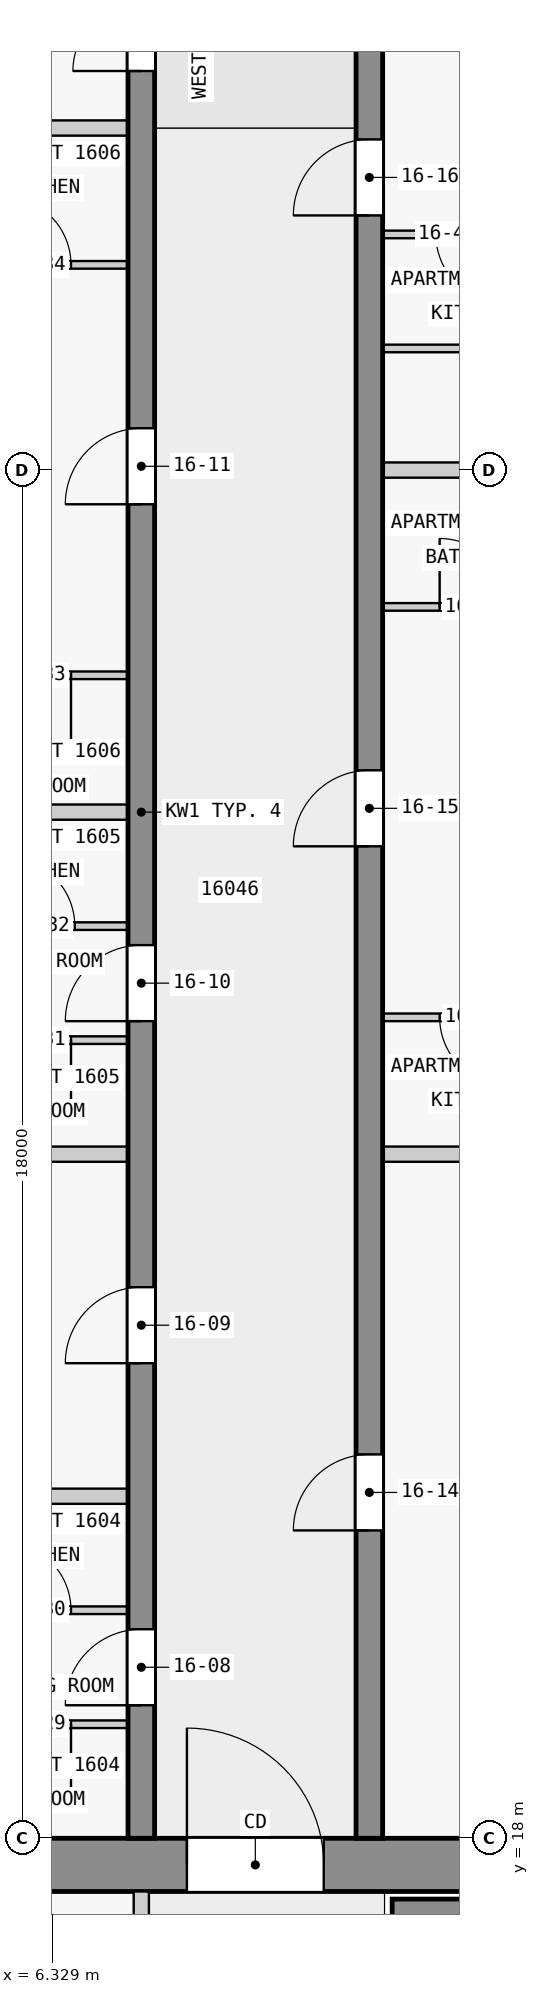
"""IFC4 building model, lengths in metres.
Left out: names, types, materials, properties, quantities, classifications, styles, units other than length and angle.
Written with IfcOpenShell. Run it as: python <this file> out.ifc"""

import sys

from ifc_helpers import new_model, si_unit, direction, frame, frame_2d, origin, place, context, subcontext, project, spatial, rectangle, extrude, element, fill, save


model = new_model("IFC4")
c1 = context("Model", 3, precision=1e-05, world=origin(), true_north=direction((0.0, 1.0)))
c2 = subcontext(c1, "Body", "Model", "MODEL_VIEW")
j1 = project(units=[si_unit("LENGTHUNIT", "METRE"), si_unit("PLANEANGLEUNIT", "RADIAN")], contexts=[c1])
p1 = place(None, origin())
s1 = spatial("IfcSite", under=j1, at=p1, CompositionType="ELEMENT")
p2 = place(p1, origin())
s2 = spatial("IfcBuilding", under=s1, at=p2, CompositionType="ELEMENT")
p3 = place(p2, frame((0.0, 0.0, 65.3)))
s3 = spatial("IfcBuildingStorey", under=s2, at=p3, CompositionType="ELEMENT", Elevation=65.3)
p4 = place(p3, frame((1.6, 17.65, 0.0), z_axis=(0.0, 0.0, 1.0), x_axis=(1.0, 0.0, 0.0)))
e1 = element("IfcWall", 1, at=p4, inside=s3, PredefinedType="SHEAR", context=c2, shape_type="SweptSolid", body=[
    extrude(rectangle(XDim=20.9, YDim=0.7, at=frame_2d((10.45, 0.0))), origin(), (0.0, 0.0, 1.0), 3.25),
])
p5 = place(p4, frame((6.5, 0.0, 0.0)))
e2 = element("IfcOpeningElement", 2, at=p5, cuts=e1, PredefinedType="OPENING", context=c2, shape_type="SweptSolid", body=[
    extrude(rectangle(XDim=1.8, YDim=2.1, at=frame_2d((0.9, 1.05))), frame((0.0, 0.36, 0.0), z_axis=(0.0, -1.0, 0.0), x_axis=(1.0, 0.0, 0.0)), (0.0, 0.0, 1.0), 0.72),
])
p6 = place(p3, frame((10.8, 17.05, 0.0), z_axis=(0.0, 0.0, 1.0), x_axis=(1.0, 0.0, 0.0)))
e3 = element("IfcWall", 3, at=p6, inside=s3, PredefinedType="SHEAR", context=c2, shape_type="SweptSolid", body=[
    extrude(rectangle(XDim=7.8, YDim=0.3, at=frame_2d((3.9, 0.0))), origin(), (0.0, 0.0, 1.0), 3.25),
])
p7 = place(p3, frame((7.5, 18.0, 0.0), z_axis=(0.0, 0.0, 1.0), x_axis=(0.0, 1.0, 0.0)))
e4 = element("IfcWall", 4, at=p7, inside=s3, PredefinedType="SHEAR", context=c2, shape_type="SweptSolid", body=[
    extrude(rectangle(XDim=27.0, YDim=0.35, at=frame_2d((13.5, 0.0))), origin(), (0.0, 0.0, 1.0), 3.25),
])
p8 = place(p7, frame((1.75, 0.0, 0.0)))
e5 = element("IfcOpeningElement", 5, at=p8, cuts=e4, PredefinedType="OPENING", context=c2, shape_type="SweptSolid", body=[
    extrude(rectangle(XDim=1.0, YDim=2.1, at=frame_2d((0.5, 1.05))), frame((0.0, 0.185, 0.0), z_axis=(0.0, -1.0, 0.0), x_axis=(1.0, 0.0, 0.0)), (0.0, 0.0, 1.0), 0.37),
])
p9 = place(p7, frame((6.25, 0.0, 0.0)))
e6 = element("IfcOpeningElement", 6, at=p9, cuts=e4, PredefinedType="OPENING", context=c2, shape_type="SweptSolid", body=[
    extrude(rectangle(XDim=1.0, YDim=2.1, at=frame_2d((0.5, 1.05))), frame((0.0, 0.185, 0.0), z_axis=(0.0, -1.0, 0.0), x_axis=(1.0, 0.0, 0.0)), (0.0, 0.0, 1.0), 0.37),
])
p10 = place(p7, frame((10.75, 0.0, 0.0)))
e7 = element("IfcOpeningElement", 7, at=p10, cuts=e4, PredefinedType="OPENING", context=c2, shape_type="SweptSolid", body=[
    extrude(rectangle(XDim=1.0, YDim=2.1, at=frame_2d((0.5, 1.05))), frame((0.0, 0.185, 0.0), z_axis=(0.0, -1.0, 0.0), x_axis=(1.0, 0.0, 0.0)), (0.0, 0.0, 1.0), 0.37),
])
p11 = place(p7, frame((17.55, 0.0, 0.0)))
e8 = element("IfcOpeningElement", 8, at=p11, cuts=e4, PredefinedType="OPENING", context=c2, shape_type="SweptSolid", body=[
    extrude(rectangle(XDim=1.0, YDim=2.1, at=frame_2d((0.5, 1.05))), frame((0.0, 0.185, 0.0), z_axis=(0.0, -1.0, 0.0), x_axis=(1.0, 0.0, 0.0)), (0.0, 0.0, 1.0), 0.37),
])
p12 = place(p7, frame((23.25, 0.0, 0.0)))
e9 = element("IfcOpeningElement", 9, at=p12, cuts=e4, PredefinedType="OPENING", context=c2, shape_type="SweptSolid", body=[
    extrude(rectangle(XDim=0.9, YDim=2.1, at=frame_2d((0.45, 1.05))), frame((0.0, 0.185, 0.0), z_axis=(0.0, -1.0, 0.0), x_axis=(1.0, 0.0, 0.0)), (0.0, 0.0, 1.0), 0.37),
])
p13 = place(p7, frame((25.45, 0.0, 0.0)))
e10 = element("IfcOpeningElement", 10, at=p13, cuts=e4, PredefinedType="OPENING", context=c2, shape_type="SweptSolid", body=[
    extrude(rectangle(XDim=1.0, YDim=2.1, at=frame_2d((0.5, 1.05))), frame((0.0, 0.185, 0.0), z_axis=(0.0, -1.0, 0.0), x_axis=(1.0, 0.0, 0.0)), (0.0, 0.0, 1.0), 0.37),
])
p14 = place(p3, frame((10.5, 18.0, 0.0), z_axis=(0.0, 0.0, 1.0), x_axis=(0.0, 1.0, 0.0)))
e11 = element("IfcWall", 11, at=p14, inside=s3, PredefinedType="SHEAR", context=c2, shape_type="SweptSolid", body=[
    extrude(rectangle(XDim=27.0, YDim=0.35, at=frame_2d((13.5, 0.0))), origin(), (0.0, 0.0, 1.0), 3.25),
])
p15 = place(p14, frame((4.05, 0.0, 0.0)))
e12 = element("IfcOpeningElement", 12, at=p15, cuts=e11, PredefinedType="OPENING", context=c2, shape_type="SweptSolid", body=[
    extrude(rectangle(XDim=1.0, YDim=2.1, at=frame_2d((0.5, 1.05))), frame((0.0, 0.185, 0.0), z_axis=(0.0, -1.0, 0.0), x_axis=(1.0, 0.0, 0.0)), (0.0, 0.0, 1.0), 0.37),
])
p16 = place(p14, frame((13.05, 0.0, 0.0)))
e13 = element("IfcOpeningElement", 13, at=p16, cuts=e11, PredefinedType="OPENING", context=c2, shape_type="SweptSolid", body=[
    extrude(rectangle(XDim=1.0, YDim=2.1, at=frame_2d((0.5, 1.05))), frame((0.0, 0.185, 0.0), z_axis=(0.0, -1.0, 0.0), x_axis=(1.0, 0.0, 0.0)), (0.0, 0.0, 1.0), 0.37),
])
p17 = place(p14, frame((21.35, 0.0, 0.0)))
e14 = element("IfcOpeningElement", 14, at=p17, cuts=e11, PredefinedType="OPENING", context=c2, shape_type="SweptSolid", body=[
    extrude(rectangle(XDim=1.0, YDim=2.1, at=frame_2d((0.5, 1.05))), frame((0.0, 0.185, 0.0), z_axis=(0.0, -1.0, 0.0), x_axis=(1.0, 0.0, 0.0)), (0.0, 0.0, 1.0), 0.37),
])
p18 = place(p3, frame((7.5, 10.1, 0.0), z_axis=(0.0, 0.0, 1.0), x_axis=(0.0, 1.0, 0.0)))
e15 = element("IfcWall", 15, at=p18, inside=s3, PredefinedType="PARTITIONING", context=c2, shape_type="SweptSolid", body=[
    extrude(rectangle(XDim=7.2, YDim=0.2, at=frame_2d((3.6, 0.0))), origin(), (0.0, 0.0, 1.0), 3.25),
])
p19 = place(p18, frame((0.8, 0.0, 0.0)))
e16 = element("IfcOpeningElement", 16, at=p19, cuts=e15, PredefinedType="OPENING", context=c2, shape_type="SweptSolid", body=[
    extrude(rectangle(XDim=0.9, YDim=2.1, at=frame_2d((0.45, 1.05))), frame((0.0, 0.11, 0.0), z_axis=(0.0, -1.0, 0.0), x_axis=(1.0, 0.0, 0.0)), (0.0, 0.0, 1.0), 0.22),
])
p20 = place(p18, frame((3.3, 0.0, 0.0)))
e17 = element("IfcOpeningElement", 17, at=p20, cuts=e15, PredefinedType="OPENING", context=c2, shape_type="SweptSolid", body=[
    extrude(rectangle(XDim=0.9, YDim=2.1, at=frame_2d((0.45, 1.05))), frame((0.0, 0.11, 0.0), z_axis=(0.0, -1.0, 0.0), x_axis=(1.0, 0.0, 0.0)), (0.0, 0.0, 1.0), 0.22),
])
p21 = place(p18, frame((5.25, 0.0, 0.0)))
e18 = element("IfcOpeningElement", 18, at=p21, cuts=e15, PredefinedType="OPENING", context=c2, shape_type="SweptSolid", body=[
    extrude(rectangle(XDim=0.9, YDim=2.1, at=frame_2d((0.45, 1.05))), frame((0.0, 0.11, 0.0), z_axis=(0.0, -1.0, 0.0), x_axis=(1.0, 0.0, 0.0)), (0.0, 0.0, 1.0), 0.22),
])
p22 = place(p3, frame((7.325, 19.5, 0.0), z_axis=(0.0, 0.0, 1.0), x_axis=(-1.0, 0.0, 0.0)))
e19 = element("IfcWall", 19, at=p22, inside=s3, PredefinedType="PARTITIONING", context=c2, shape_type="SweptSolid", body=[
    extrude(rectangle(XDim=2.4, YDim=0.1, at=frame_2d((1.2, 0.0))), origin(), (0.0, 0.0, 1.0), 3.25),
])
p23 = place(p22, frame((0.75, 0.0, 0.0)))
e20 = element("IfcOpeningElement", 20, at=p23, cuts=e19, PredefinedType="OPENING", context=c2, shape_type="SweptSolid", body=[
    extrude(rectangle(XDim=0.9, YDim=2.1, at=frame_2d((0.45, 1.05))), frame((0.0, 0.06, 0.0), z_axis=(0.0, -1.0, 0.0), x_axis=(1.0, 0.0, 0.0)), (0.0, 0.0, 1.0), 0.12),
])
p24 = place(p3, frame((4.925, 21.0, 0.0), z_axis=(0.0, 0.0, 1.0), x_axis=(1.0, 0.0, 0.0)))
e21 = element("IfcWall", 21, at=p24, inside=s3, PredefinedType="PARTITIONING", context=c2, shape_type="SweptSolid", body=[
    extrude(rectangle(XDim=2.4, YDim=0.1, at=frame_2d((1.2, 0.0))), origin(), (0.0, 0.0, 1.0), 3.25),
])
p25 = place(p24, frame((0.75, 0.0, 0.0)))
e22 = element("IfcOpeningElement", 22, at=p25, cuts=e21, PredefinedType="OPENING", context=c2, shape_type="SweptSolid", body=[
    extrude(rectangle(XDim=0.9, YDim=2.1, at=frame_2d((0.45, 1.05))), frame((0.0, 0.06, 0.0), z_axis=(0.0, -1.0, 0.0), x_axis=(1.0, 0.0, 0.0)), (0.0, 0.0, 1.0), 0.12),
])
p26 = place(p3, frame((7.325, 22.5, 0.0), z_axis=(0.0, 0.0, 1.0), x_axis=(-1.0, 0.0, 0.0)))
e23 = element("IfcWall", 23, at=p26, inside=s3, PredefinedType="PARTITIONING", context=c2, shape_type="SweptSolid", body=[
    extrude(rectangle(XDim=2.3, YDim=0.2, at=frame_2d((1.15, 0.0))), origin(), (0.0, 0.0, 1.0), 3.25),
])
for number, where, z_axis, x_axis in (
    (24, (7.325, 27.0, 0.0), (0.0, 0.0, 1.0), (-1.0, 0.0, 0.0)),
    (25, (18.08, 27.0, 0.0), (0.0, 0.0, 1.0), (-1.0, 0.0, 0.0)),
):
    element("IfcWall", number, at=place(p3, frame(where, z_axis=z_axis, x_axis=x_axis)), inside=s3, PredefinedType="PARTITIONING", context=c2, shape_type="SweptSolid", body=[
        extrude(rectangle(XDim=7.405, YDim=0.2, at=frame_2d((3.703, 0.0))), origin(), (0.0, 0.0, 1.0), 3.25),
    ])
p27 = place(p3, frame((7.325, 28.5, 0.0), z_axis=(0.0, 0.0, 1.0), x_axis=(-1.0, 0.0, 0.0)))
e26 = element("IfcWall", 26, at=p27, inside=s3, PredefinedType="PARTITIONING", context=c2, shape_type="SweptSolid", body=[
    extrude(rectangle(XDim=2.4, YDim=0.1, at=frame_2d((1.2, 0.0))), origin(), (0.0, 0.0, 1.0), 3.25),
])
p28 = place(p27, frame((0.75, 0.0, 0.0)))
e27 = element("IfcOpeningElement", 27, at=p28, cuts=e26, PredefinedType="OPENING", context=c2, shape_type="SweptSolid", body=[
    extrude(rectangle(XDim=0.9, YDim=2.1, at=frame_2d((0.45, 1.05))), frame((0.0, 0.06, 0.0), z_axis=(0.0, -1.0, 0.0), x_axis=(1.0, 0.0, 0.0)), (0.0, 0.0, 1.0), 0.12),
])
p29 = place(p3, frame((13.075, 28.8, 0.0), z_axis=(0.0, 0.0, 1.0), x_axis=(-1.0, 0.0, 0.0)))
e28 = element("IfcWall", 28, at=p29, inside=s3, PredefinedType="PARTITIONING", context=c2, shape_type="SweptSolid", body=[
    extrude(rectangle(XDim=2.4, YDim=0.1, at=frame_2d((1.2, 0.0))), origin(), (0.0, 0.0, 1.0), 3.25),
])
p30 = place(p29, frame((0.75, 0.0, 0.0)))
e29 = element("IfcOpeningElement", 29, at=p30, cuts=e28, PredefinedType="OPENING", context=c2, shape_type="SweptSolid", body=[
    extrude(rectangle(XDim=0.9, YDim=2.1, at=frame_2d((0.45, 1.05))), frame((0.0, 0.06, 0.0), z_axis=(0.0, -1.0, 0.0), x_axis=(1.0, 0.0, 0.0)), (0.0, 0.0, 1.0), 0.12),
])
p31 = place(p3, frame((4.975, 30.0, 0.0), z_axis=(0.0, 0.0, 1.0), x_axis=(1.0, 0.0, 0.0)))
e30 = element("IfcWall", 30, at=p31, inside=s3, PredefinedType="PARTITIONING", context=c2, shape_type="SweptSolid", body=[
    extrude(rectangle(XDim=2.35, YDim=0.1, at=frame_2d((1.175, 0.0))), origin(), (0.0, 0.0, 1.0), 3.25),
])
p32 = place(p31, frame((0.75, 0.0, 0.0)))
e31 = element("IfcOpeningElement", 31, at=p32, cuts=e30, PredefinedType="OPENING", context=c2, shape_type="SweptSolid", body=[
    extrude(rectangle(XDim=0.9, YDim=2.1, at=frame_2d((0.45, 1.05))), frame((0.0, 0.06, 0.0), z_axis=(0.0, -1.0, 0.0), x_axis=(1.0, 0.0, 0.0)), (0.0, 0.0, 1.0), 0.12),
])
p33 = place(p3, frame((7.325, 31.5, 0.0), z_axis=(0.0, 0.0, 1.0), x_axis=(-1.0, 0.0, 0.0)))
e32 = element("IfcWall", 32, at=p33, inside=s3, PredefinedType="PARTITIONING", context=c2, shape_type="SweptSolid", body=[
    extrude(rectangle(XDim=2.3, YDim=0.2, at=frame_2d((1.15, 0.0))), origin(), (0.0, 0.0, 1.0), 3.25),
])
p34 = place(p3, frame((7.325, 33.3, 0.0), z_axis=(0.0, 0.0, 1.0), x_axis=(-1.0, 0.0, 0.0)))
e33 = element("IfcWall", 33, at=p34, inside=s3, PredefinedType="PARTITIONING", context=c2, shape_type="SweptSolid", body=[
    extrude(rectangle(XDim=2.35, YDim=0.1, at=frame_2d((1.175, 0.0))), origin(), (0.0, 0.0, 1.0), 3.25),
])
p35 = place(p34, frame((0.75, 0.0, 0.0)))
e34 = element("IfcOpeningElement", 34, at=p35, cuts=e33, PredefinedType="OPENING", context=c2, shape_type="SweptSolid", body=[
    extrude(rectangle(XDim=0.9, YDim=2.1, at=frame_2d((0.45, 1.05))), frame((0.0, 0.06, 0.0), z_axis=(0.0, -1.0, 0.0), x_axis=(1.0, 0.0, 0.0)), (0.0, 0.0, 1.0), 0.12),
])
p36 = place(p3, frame((10.675, 34.2, 0.0), z_axis=(0.0, 0.0, 1.0), x_axis=(1.0, 0.0, 0.0)))
e35 = element("IfcWall", 35, at=p36, inside=s3, PredefinedType="PARTITIONING", context=c2, shape_type="SweptSolid", body=[
    extrude(rectangle(XDim=2.35, YDim=0.1, at=frame_2d((1.175, 0.0))), origin(), (0.0, 0.0, 1.0), 3.25),
])
p37 = place(p36, frame((0.75, 0.0, 0.0)))
e36 = element("IfcOpeningElement", 36, at=p37, cuts=e35, PredefinedType="OPENING", context=c2, shape_type="SweptSolid", body=[
    extrude(rectangle(XDim=0.9, YDim=2.1, at=frame_2d((0.45, 1.05))), frame((0.0, 0.06, 0.0), z_axis=(0.0, -1.0, 0.0), x_axis=(1.0, 0.0, 0.0)), (0.0, 0.0, 1.0), 0.12),
])
p38 = place(p3, frame((16.6, 36.0, 0.0), z_axis=(0.0, 0.0, 1.0), x_axis=(-1.0, 0.0, 0.0)))
e37 = element("IfcWall", 37, at=p38, inside=s3, PredefinedType="PARTITIONING", context=c2, shape_type="SweptSolid", body=[
    extrude(rectangle(XDim=5.925, YDim=0.2, at=frame_2d((2.962, 0.0))), origin(), (0.0, 0.0, 1.0), 3.25),
])
p39 = place(p3, frame((13.025, 37.6, 0.0), z_axis=(0.0, 0.0, 1.0), x_axis=(-1.0, 0.0, 0.0)))
e38 = element("IfcWall", 38, at=p39, inside=s3, PredefinedType="PARTITIONING", context=c2, shape_type="SweptSolid", body=[
    extrude(rectangle(XDim=2.35, YDim=0.1, at=frame_2d((1.175, 0.0))), origin(), (0.0, 0.0, 1.0), 3.25),
])
p40 = place(p3, frame((4.925, 38.7, 0.0), z_axis=(0.0, 0.0, 1.0), x_axis=(1.0, 0.0, 0.0)))
e39 = element("IfcWall", 39, at=p40, inside=s3, PredefinedType="PARTITIONING", context=c2, shape_type="SweptSolid", body=[
    extrude(rectangle(XDim=2.4, YDim=0.1, at=frame_2d((1.2, 0.0))), origin(), (0.0, 0.0, 1.0), 3.25),
])
p41 = place(p40, frame((0.75, 0.0, 0.0)))
e40 = element("IfcOpeningElement", 40, at=p41, cuts=e39, PredefinedType="OPENING", context=c2, shape_type="SweptSolid", body=[
    extrude(rectangle(XDim=0.9, YDim=2.1, at=frame_2d((0.45, 1.05))), frame((0.0, 0.06, 0.0), z_axis=(0.0, -1.0, 0.0), x_axis=(1.0, 0.0, 0.0)), (0.0, 0.0, 1.0), 0.12),
])
p42 = place(p3, frame((13.025, 39.1, 0.0), z_axis=(0.0, 0.0, 1.0), x_axis=(-1.0, 0.0, 0.0)))
e41 = element("IfcWall", 41, at=p42, inside=s3, PredefinedType="PARTITIONING", context=c2, shape_type="SweptSolid", body=[
    extrude(rectangle(XDim=2.35, YDim=0.1, at=frame_2d((1.175, 0.0))), origin(), (0.0, 0.0, 1.0), 3.25),
])
p43 = place(p42, frame((0.75, 0.0, 0.0)))
e42 = element("IfcOpeningElement", 42, at=p43, cuts=e41, PredefinedType="OPENING", context=c2, shape_type="SweptSolid", body=[
    extrude(rectangle(XDim=0.9, YDim=2.1, at=frame_2d((0.45, 1.05))), frame((0.0, 0.06, 0.0), z_axis=(0.0, -1.0, 0.0), x_axis=(1.0, 0.0, 0.0)), (0.0, 0.0, 1.0), 0.12),
])
p44 = place(p3, frame((7.325, 40.5, 0.0), z_axis=(0.0, 0.0, 1.0), x_axis=(-1.0, 0.0, 0.0)))
e43 = element("IfcWall", 43, at=p44, inside=s3, PredefinedType="PARTITIONING", context=c2, shape_type="SweptSolid", body=[
    extrude(rectangle(XDim=2.3, YDim=0.2, at=frame_2d((1.15, 0.0))), origin(), (0.0, 0.0, 1.0), 3.25),
])
p45 = place(p5, origin())
e44 = element("IfcDoor", 44, at=p45, inside=s3, OperationType="DOUBLE_DOOR_SINGLE_SWING", PredefinedType="DOOR", context=c2, shape_type="SweptSolid", body=[
    extrude(rectangle(XDim=1.8, YDim=2.1, at=frame_2d((0.9, 1.05))), frame((0.0, 0.025, 0.0), z_axis=(0.0, -1.0, 0.0), x_axis=(1.0, 0.0, 0.0)), (0.0, 0.0, 1.0), 0.05),
])
fill(e2, e44)
p46 = place(p8, origin())
e45 = element("IfcDoor", 45, at=p46, inside=s3, OperationType="SINGLE_SWING_LEFT", PredefinedType="DOOR", context=c2, shape_type="SweptSolid", body=[
    extrude(rectangle(XDim=1.0, YDim=2.1, at=frame_2d((0.5, 1.05))), frame((0.0, 0.025, 0.0), z_axis=(0.0, -1.0, 0.0), x_axis=(1.0, 0.0, 0.0)), (0.0, 0.0, 1.0), 0.05),
])
fill(e5, e45)
p47 = place(p9, origin())
e46 = element("IfcDoor", 46, at=p47, inside=s3, OperationType="SINGLE_SWING_LEFT", PredefinedType="DOOR", context=c2, shape_type="SweptSolid", body=[
    extrude(rectangle(XDim=1.0, YDim=2.1, at=frame_2d((0.5, 1.05))), frame((0.0, 0.025, 0.0), z_axis=(0.0, -1.0, 0.0), x_axis=(1.0, 0.0, 0.0)), (0.0, 0.0, 1.0), 0.05),
])
fill(e6, e46)
p48 = place(p10, origin())
e47 = element("IfcDoor", 47, at=p48, inside=s3, OperationType="SINGLE_SWING_LEFT", PredefinedType="DOOR", context=c2, shape_type="SweptSolid", body=[
    extrude(rectangle(XDim=1.0, YDim=2.1, at=frame_2d((0.5, 1.05))), frame((0.0, 0.025, 0.0), z_axis=(0.0, -1.0, 0.0), x_axis=(1.0, 0.0, 0.0)), (0.0, 0.0, 1.0), 0.05),
])
fill(e7, e47)
p49 = place(p11, origin())
e48 = element("IfcDoor", 48, at=p49, inside=s3, OperationType="SINGLE_SWING_RIGHT", PredefinedType="DOOR", context=c2, shape_type="SweptSolid", body=[
    extrude(rectangle(XDim=1.0, YDim=2.1, at=frame_2d((0.5, 1.05))), frame((0.0, 0.025, 0.0), z_axis=(0.0, -1.0, 0.0), x_axis=(1.0, 0.0, 0.0)), (0.0, 0.0, 1.0), 0.05),
])
fill(e8, e48)
p50 = place(p12, origin())
e49 = element("IfcDoor", 49, at=p50, inside=s3, OperationType="SINGLE_SWING_RIGHT", PredefinedType="DOOR", context=c2, shape_type="SweptSolid", body=[
    extrude(rectangle(XDim=0.9, YDim=2.1, at=frame_2d((0.45, 1.05))), frame((0.0, 0.025, 0.0), z_axis=(0.0, -1.0, 0.0), x_axis=(1.0, 0.0, 0.0)), (0.0, 0.0, 1.0), 0.05),
])
fill(e9, e49)
p51 = place(p15, origin())
e50 = element("IfcDoor", 50, at=p51, inside=s3, OperationType="SINGLE_SWING_LEFT", PredefinedType="DOOR", context=c2, shape_type="SweptSolid", body=[
    extrude(rectangle(XDim=1.0, YDim=2.1, at=frame_2d((0.5, 1.05))), frame((0.0, 0.025, 0.0), z_axis=(0.0, -1.0, 0.0), x_axis=(1.0, 0.0, 0.0)), (0.0, 0.0, 1.0), 0.05),
])
fill(e12, e50)
p52 = place(p16, origin())
e51 = element("IfcDoor", 51, at=p52, inside=s3, OperationType="SINGLE_SWING_RIGHT", PredefinedType="DOOR", context=c2, shape_type="SweptSolid", body=[
    extrude(rectangle(XDim=1.0, YDim=2.1, at=frame_2d((0.5, 1.05))), frame((0.0, 0.025, 0.0), z_axis=(0.0, -1.0, 0.0), x_axis=(1.0, 0.0, 0.0)), (0.0, 0.0, 1.0), 0.05),
])
fill(e13, e51)
p53 = place(p17, origin())
e52 = element("IfcDoor", 52, at=p53, inside=s3, OperationType="SINGLE_SWING_RIGHT", PredefinedType="DOOR", context=c2, shape_type="SweptSolid", body=[
    extrude(rectangle(XDim=1.0, YDim=2.1, at=frame_2d((0.5, 1.05))), frame((0.0, 0.025, 0.0), z_axis=(0.0, -1.0, 0.0), x_axis=(1.0, 0.0, 0.0)), (0.0, 0.0, 1.0), 0.05),
])
fill(e14, e52)
p54 = place(p23, origin())
e53 = element("IfcDoor", 53, at=p54, inside=s3, OperationType="SINGLE_SWING_LEFT", PredefinedType="DOOR", context=c2, shape_type="SweptSolid", body=[
    extrude(rectangle(XDim=0.9, YDim=2.1, at=frame_2d((0.45, 1.05))), frame((0.0, 0.025, 0.0), z_axis=(0.0, -1.0, 0.0), x_axis=(1.0, 0.0, 0.0)), (0.0, 0.0, 1.0), 0.05),
])
fill(e20, e53)
p55 = place(p25, origin())
e54 = element("IfcDoor", 54, at=p55, inside=s3, OperationType="SINGLE_SWING_LEFT", PredefinedType="DOOR", context=c2, shape_type="SweptSolid", body=[
    extrude(rectangle(XDim=0.9, YDim=2.1, at=frame_2d((0.45, 1.05))), frame((0.0, 0.025, 0.0), z_axis=(0.0, -1.0, 0.0), x_axis=(1.0, 0.0, 0.0)), (0.0, 0.0, 1.0), 0.05),
])
fill(e22, e54)
p56 = place(p28, origin())
e55 = element("IfcDoor", 55, at=p56, inside=s3, OperationType="SINGLE_SWING_LEFT", PredefinedType="DOOR", context=c2, shape_type="SweptSolid", body=[
    extrude(rectangle(XDim=0.9, YDim=2.1, at=frame_2d((0.45, 1.05))), frame((0.0, 0.025, 0.0), z_axis=(0.0, -1.0, 0.0), x_axis=(1.0, 0.0, 0.0)), (0.0, 0.0, 1.0), 0.05),
])
fill(e27, e55)
p57 = place(p32, origin())
e56 = element("IfcDoor", 56, at=p57, inside=s3, OperationType="SINGLE_SWING_RIGHT", PredefinedType="DOOR", context=c2, shape_type="SweptSolid", body=[
    extrude(rectangle(XDim=0.9, YDim=2.1, at=frame_2d((0.45, 1.05))), frame((0.0, 0.025, 0.0), z_axis=(0.0, -1.0, 0.0), x_axis=(1.0, 0.0, 0.0)), (0.0, 0.0, 1.0), 0.05),
])
fill(e31, e56)
p58 = place(p35, origin())
e57 = element("IfcDoor", 57, at=p58, inside=s3, OperationType="SINGLE_SWING_RIGHT", PredefinedType="DOOR", context=c2, shape_type="SweptSolid", body=[
    extrude(rectangle(XDim=0.9, YDim=2.1, at=frame_2d((0.45, 1.05))), frame((0.0, 0.025, 0.0), z_axis=(0.0, -1.0, 0.0), x_axis=(1.0, 0.0, 0.0)), (0.0, 0.0, 1.0), 0.05),
])
fill(e34, e57)
p59 = place(p41, origin())
e58 = element("IfcDoor", 58, at=p59, inside=s3, OperationType="SINGLE_SWING_LEFT", PredefinedType="DOOR", context=c2, shape_type="SweptSolid", body=[
    extrude(rectangle(XDim=0.9, YDim=2.1, at=frame_2d((0.45, 1.05))), frame((0.0, 0.025, 0.0), z_axis=(0.0, -1.0, 0.0), x_axis=(1.0, 0.0, 0.0)), (0.0, 0.0, 1.0), 0.05),
])
fill(e40, e58)
p60 = place(p30, origin())
e59 = element("IfcDoor", 59, at=p60, inside=s3, OperationType="SINGLE_SWING_RIGHT", PredefinedType="DOOR", context=c2, shape_type="SweptSolid", body=[
    extrude(rectangle(XDim=0.9, YDim=2.1, at=frame_2d((0.45, 1.05))), frame((0.0, 0.025, 0.0), z_axis=(0.0, -1.0, 0.0), x_axis=(1.0, 0.0, 0.0)), (0.0, 0.0, 1.0), 0.05),
])
fill(e29, e59)
p61 = place(p37, origin())
e60 = element("IfcDoor", 60, at=p61, inside=s3, OperationType="SINGLE_SWING_RIGHT", PredefinedType="DOOR", context=c2, shape_type="SweptSolid", body=[
    extrude(rectangle(XDim=0.9, YDim=2.1, at=frame_2d((0.45, 1.05))), frame((0.0, 0.025, 0.0), z_axis=(0.0, -1.0, 0.0), x_axis=(1.0, 0.0, 0.0)), (0.0, 0.0, 1.0), 0.05),
])
fill(e36, e60)
p62 = place(p43, origin())
e61 = element("IfcDoor", 61, at=p62, inside=s3, OperationType="SINGLE_SWING_RIGHT", PredefinedType="DOOR", context=c2, shape_type="SweptSolid", body=[
    extrude(rectangle(XDim=0.9, YDim=2.1, at=frame_2d((0.45, 1.05))), frame((0.0, 0.025, 0.0), z_axis=(0.0, -1.0, 0.0), x_axis=(1.0, 0.0, 0.0)), (0.0, 0.0, 1.0), 0.05),
])
fill(e42, e61)
save(model, sys.argv[1])
